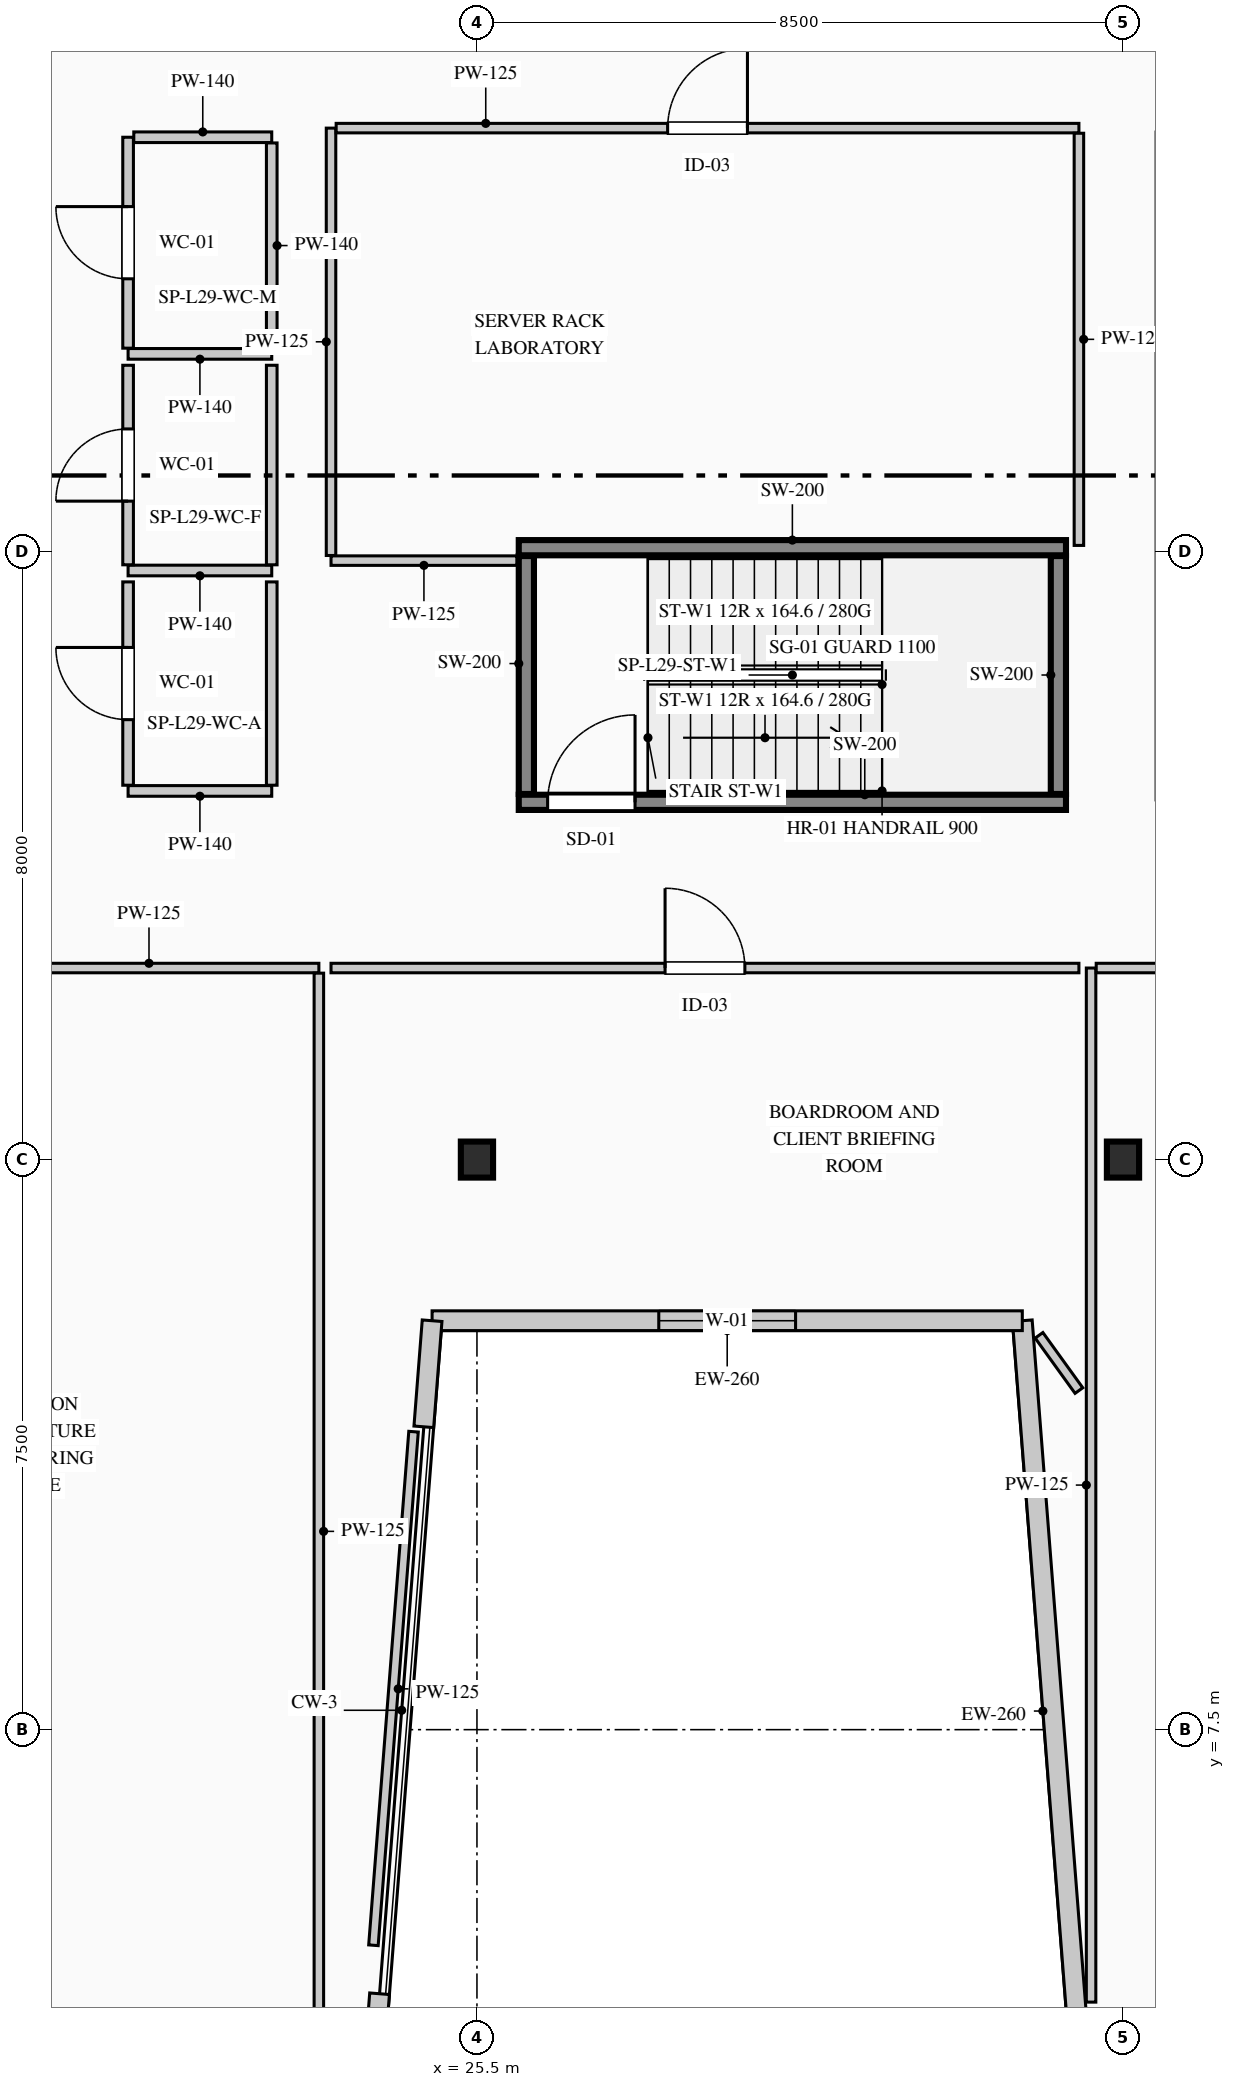
"""IFC4 building model, lengths in metres.
Left out: names, types, materials, properties, quantities, classifications, styles, units other than length and angle.
Written with IfcOpenShell. Run it as: python <this file> out.ifc"""

import sys

from ifc_helpers import new_model, si_unit, direction, frame, frame_2d, origin, origin_2d, place, context, subcontext, project, spatial, rectangle, i_section, extrude, element, fill, save


model = new_model("IFC4")
c1 = context("Model", 3, precision=1e-05, world=origin(), true_north=direction((0.0, 1.0)))
c2 = subcontext(c1, "Body", "Model", "MODEL_VIEW")
j1 = project(units=[si_unit("LENGTHUNIT", "METRE"), si_unit("PLANEANGLEUNIT", "RADIAN")], contexts=[c1])
p1 = place(None, origin())
s1 = spatial("IfcSite", under=j1, at=p1, CompositionType="ELEMENT")
p2 = place(p1, origin())
s2 = spatial("IfcBuilding", under=s1, at=p2, CompositionType="ELEMENT")
p3 = place(p2, frame((0.0, 0.0, 127.2)))
s3 = spatial("IfcBuildingStorey", under=s2, at=p3, CompositionType="ELEMENT", Elevation=127.2)
p4 = place(p3, frame((26.05, 19.7, 0.0), z_axis=(0.0, 0.0, 1.0), x_axis=(1.0, 0.0, 0.0)))
e1 = element("IfcWall", 1, at=p4, inside=s3, PredefinedType="SHEAR", context=c2, shape_type="SweptSolid", body=[
    extrude(rectangle(XDim=7.2, YDim=0.2, at=frame_2d((3.6, 0.0))), origin(), (0.0, 0.0, 1.0), 3.95),
])
p5 = place(p4, frame((0.38, 0.0, 0.0)))
e2 = element("IfcOpeningElement", 2, at=p5, cuts=e1, PredefinedType="OPENING", context=c2, shape_type="SweptSolid", body=[
    extrude(rectangle(XDim=1.15, YDim=2.2, at=frame_2d((0.575, 1.1))), frame((0.0, 0.11, 0.0), z_axis=(0.0, -1.0, 0.0), x_axis=(1.0, 0.0, 0.0)), (0.0, 0.0, 1.0), 0.22),
])
p6 = place(p3, frame((26.05, 23.05, 0.0), z_axis=(0.0, 0.0, 1.0), x_axis=(1.0, 0.0, 0.0)))
e3 = element("IfcWall", 3, at=p6, inside=s3, PredefinedType="SHEAR", context=c2, shape_type="SweptSolid", body=[
    extrude(rectangle(XDim=7.2, YDim=0.2, at=frame_2d((3.6, 0.0))), origin(), (0.0, 0.0, 1.0), 3.95),
])
for number, where, z_axis, x_axis in (
    (4, (26.15, 19.81, 0.0), (0.0, 0.0, 1.0), (0.0, 1.0, 0.0)),
    (5, (33.15, 19.81, 0.0), (0.0, 0.0, 1.0), (0.0, 1.0, 0.0)),
):
    element("IfcWall", number, at=place(p3, frame(where, z_axis=z_axis, x_axis=x_axis)), inside=s3, PredefinedType="SHEAR", context=c2, shape_type="SweptSolid", body=[
        extrude(rectangle(XDim=3.13, YDim=0.2, at=frame_2d((1.565, 0.0))), origin(), (0.0, 0.0, 1.0), 3.95),
    ])
for number, where, z_axis, x_axis in (
    (6, (25.5, 15.0, 0.0), (0.0, 0.0, 1.0), (1.0, 0.0, 0.0)),
    (7, (34.0, 15.0, 0.0), (0.0, 0.0, 1.0), (1.0, 0.0, 0.0)),
):
    element("IfcColumn", number, at=place(p3, frame(where, z_axis=z_axis, x_axis=x_axis)), inside=s3, PredefinedType="COLUMN", context=c2, shape_type="SweptSolid", body=[
        extrude(i_section(OverallWidth=0.424, OverallDepth=0.474, WebThickness=0.048, FlangeThickness=0.077, FilletRadius=0.015, at=origin_2d()), origin(), (0.0, 0.0, 1.0), 3.95),
    ])
p7 = place(p3, frame((33.475, 2.63, 0.0), z_axis=(0.0, 0.0, 1.0), x_axis=(-0.077793257511, 0.996969512616, 0.0)))
e8 = element("IfcWall", 8, at=p7, inside=s3, PredefinedType="STANDARD", context=c2, shape_type="SweptSolid", body=[
    extrude(rectangle(XDim=10.281, YDim=0.26, at=frame_2d((5.141, 0.0))), origin(), (0.0, 0.0, 1.0), 3.69),
])
p8 = place(p3, frame((32.675, 12.88, 0.0), z_axis=(0.0, 0.0, 1.0), x_axis=(-1.0, 0.0, 0.0)))
e9 = element("IfcWall", 9, at=p8, inside=s3, PredefinedType="STANDARD", context=c2, shape_type="SweptSolid", body=[
    extrude(rectangle(XDim=7.765, YDim=0.26, at=frame_2d((3.883, 0.0))), origin(), (0.0, 0.0, 1.0), 3.69),
])
p9 = place(p8, frame((2.983, 0.0, 0.9)))
e10 = element("IfcOpeningElement", 10, at=p9, cuts=e9, PredefinedType="OPENING", context=c2, shape_type="SweptSolid", body=[
    extrude(rectangle(XDim=1.8, YDim=2.1, at=frame_2d((0.9, 1.05))), frame((0.0, 0.14, 0.0), z_axis=(0.0, -1.0, 0.0), x_axis=(1.0, 0.0, 0.0)), (0.0, 0.0, 1.0), 0.28),
])
for number, where, z_axis, x_axis in (
    (11, (24.91, 12.88, 0.0), (0.0, 0.0, 1.0), (-0.078, -0.997, 0.0)),
    (12, (24.219, 4.026, 0.0), (0.0, 0.0, 1.0), (-0.078, -0.997, 0.0)),
):
    element("IfcWall", number, at=place(p3, frame(where, z_axis=z_axis, x_axis=x_axis)), inside=s3, PredefinedType="STANDARD", context=c2, shape_type="SweptSolid", body=[
        extrude(rectangle(XDim=1.4, YDim=0.26, at=frame_2d((0.7, 0.0))), origin(), (0.0, 0.0, 1.0), 3.69),
    ])
p10 = place(p3, frame((22.8, 25.6, 0.0), z_axis=(0.0, 0.0, 1.0), x_axis=(-1.0, 0.0, 0.0)))
e13 = element("IfcWall", 13, at=p10, inside=s3, PredefinedType="PARTITIONING", context=c2, shape_type="SweptSolid", body=[
    extrude(rectangle(XDim=1.89, YDim=0.14, at=frame_2d((0.945, 0.0))), origin(), (0.0, 0.0, 1.0), 3.69),
])
p11 = place(p3, frame((20.91, 25.675, 0.0), z_axis=(0.0, 0.0, 1.0), x_axis=(0.0, 1.0, 0.0)))
e14 = element("IfcWall", 14, at=p11, inside=s3, PredefinedType="PARTITIONING", context=c2, shape_type="SweptSolid", body=[
    extrude(rectangle(XDim=2.775, YDim=0.14, at=frame_2d((1.387, 0.0))), origin(), (0.0, 0.0, 1.0), 3.69),
])
p12 = place(p11, frame((0.913, 0.0, 0.0)))
e15 = element("IfcOpeningElement", 15, at=p12, cuts=e14, PredefinedType="OPENING", context=c2, shape_type="SweptSolid", body=[
    extrude(rectangle(XDim=0.95, YDim=2.15, at=frame_2d((0.475, 1.075))), frame((0.0, 0.08, 0.0), z_axis=(0.0, -1.0, 0.0), x_axis=(1.0, 0.0, 0.0)), (0.0, 0.0, 1.0), 0.16),
])
p13 = place(p3, frame((20.985, 28.45, 0.0), z_axis=(0.0, 0.0, 1.0), x_axis=(1.0, 0.0, 0.0)))
e16 = element("IfcWall", 16, at=p13, inside=s3, PredefinedType="PARTITIONING", context=c2, shape_type="SweptSolid", body=[
    extrude(rectangle(XDim=1.815, YDim=0.14, at=frame_2d((0.907, 0.0))), origin(), (0.0, 0.0, 1.0), 3.69),
])
p14 = place(p3, frame((22.8, 28.375, 0.0), z_axis=(0.0, 0.0, 1.0), x_axis=(0.0, -1.0, 0.0)))
e17 = element("IfcWall", 17, at=p14, inside=s3, PredefinedType="PARTITIONING", context=c2, shape_type="SweptSolid", body=[
    extrude(rectangle(XDim=2.7, YDim=0.14, at=frame_2d((1.35, 0.0))), origin(), (0.0, 0.0, 1.0), 3.375),
])
p15 = place(p3, frame((22.8, 22.75, 0.0), z_axis=(0.0, 0.0, 1.0), x_axis=(-1.0, 0.0, 0.0)))
e18 = element("IfcWall", 18, at=p15, inside=s3, PredefinedType="PARTITIONING", context=c2, shape_type="SweptSolid", body=[
    extrude(rectangle(XDim=1.89, YDim=0.14, at=frame_2d((0.945, 0.0))), origin(), (0.0, 0.0, 1.0), 3.69),
])
p16 = place(p3, frame((20.91, 22.825, 0.0), z_axis=(0.0, 0.0, 1.0), x_axis=(0.0, 1.0, 0.0)))
e19 = element("IfcWall", 19, at=p16, inside=s3, PredefinedType="PARTITIONING", context=c2, shape_type="SweptSolid", body=[
    extrude(rectangle(XDim=2.625, YDim=0.14, at=frame_2d((1.312, 0.0))), origin(), (0.0, 0.0, 1.0), 3.69),
])
p17 = place(p16, frame((0.837, 0.0, 0.0)))
e20 = element("IfcOpeningElement", 20, at=p17, cuts=e19, PredefinedType="OPENING", context=c2, shape_type="SweptSolid", body=[
    extrude(rectangle(XDim=0.95, YDim=2.15, at=frame_2d((0.475, 1.075))), frame((0.0, 0.08, 0.0), z_axis=(0.0, -1.0, 0.0), x_axis=(1.0, 0.0, 0.0)), (0.0, 0.0, 1.0), 0.16),
])
p18 = place(p3, frame((22.8, 25.45, 0.0), z_axis=(0.0, 0.0, 1.0), x_axis=(0.0, -1.0, 0.0)))
e21 = element("IfcWall", 21, at=p18, inside=s3, PredefinedType="PARTITIONING", context=c2, shape_type="SweptSolid", body=[
    extrude(rectangle(XDim=2.625, YDim=0.14, at=frame_2d((1.312, 0.0))), origin(), (0.0, 0.0, 1.0), 3.375),
])
p19 = place(p3, frame((22.8, 19.85, 0.0), z_axis=(0.0, 0.0, 1.0), x_axis=(-1.0, 0.0, 0.0)))
e22 = element("IfcWall", 22, at=p19, inside=s3, PredefinedType="PARTITIONING", context=c2, shape_type="SweptSolid", body=[
    extrude(rectangle(XDim=1.89, YDim=0.14, at=frame_2d((0.945, 0.0))), origin(), (0.0, 0.0, 1.0), 3.69),
])
p20 = place(p3, frame((20.91, 19.925, 0.0), z_axis=(0.0, 0.0, 1.0), x_axis=(0.0, 1.0, 0.0)))
e23 = element("IfcWall", 23, at=p20, inside=s3, PredefinedType="PARTITIONING", context=c2, shape_type="SweptSolid", body=[
    extrude(rectangle(XDim=2.675, YDim=0.14, at=frame_2d((1.337, 0.0))), origin(), (0.0, 0.0, 1.0), 3.69),
])
p21 = place(p20, frame((0.863, 0.0, 0.0)))
e24 = element("IfcOpeningElement", 24, at=p21, cuts=e23, PredefinedType="OPENING", context=c2, shape_type="SweptSolid", body=[
    extrude(rectangle(XDim=0.95, YDim=2.15, at=frame_2d((0.475, 1.075))), frame((0.0, 0.08, 0.0), z_axis=(0.0, -1.0, 0.0), x_axis=(1.0, 0.0, 0.0)), (0.0, 0.0, 1.0), 0.16),
])
p22 = place(p3, frame((22.8, 22.6, 0.0), z_axis=(0.0, 0.0, 1.0), x_axis=(0.0, -1.0, 0.0)))
e25 = element("IfcWall", 25, at=p22, inside=s3, PredefinedType="PARTITIONING", context=c2, shape_type="SweptSolid", body=[
    extrude(rectangle(XDim=2.675, YDim=0.14, at=frame_2d((1.337, 0.0))), origin(), (0.0, 0.0, 1.0), 3.375),
])
p23 = place(p3, frame((12.58, 17.52, 0.0), z_axis=(0.0, 0.0, 1.0), x_axis=(1.0, 0.0, 0.0)))
e26 = element("IfcWall", 26, at=p23, inside=s3, PredefinedType="PARTITIONING", context=c2, shape_type="SweptSolid", body=[
    extrude(rectangle(XDim=10.84, YDim=0.125, at=frame_2d((5.42, 0.0))), origin(), (0.0, 0.0, 1.0), 3.69),
])
p24 = place(p23, frame((4.895, 0.0, 0.0)))
e27 = element("IfcOpeningElement", 27, at=p24, cuts=e26, PredefinedType="OPENING", context=c2, shape_type="SweptSolid", body=[
    extrude(rectangle(XDim=1.05, YDim=2.15, at=frame_2d((0.525, 1.075))), frame((0.0, 0.073, 0.0), z_axis=(0.0, -1.0, 0.0), x_axis=(1.0, 0.0, 0.0)), (0.0, 0.0, 1.0), 0.145),
])
p25 = place(p3, frame((23.42, 17.452, 0.0), z_axis=(0.0, 0.0, 1.0), x_axis=(0.0, -1.0, 0.0)))
e28 = element("IfcWall", 28, at=p25, inside=s3, PredefinedType="PARTITIONING", context=c2, shape_type="SweptSolid", body=[
    extrude(rectangle(XDim=14.688, YDim=0.125, at=frame_2d((7.344, 0.0))), origin(), (0.0, 0.0, 1.0), 3.69),
])
p26 = place(p3, frame((33.58, 3.915, 0.0), z_axis=(0.0, 0.0, 1.0), x_axis=(0.0, 1.0, 0.0)))
e29 = element("IfcWall", 29, at=p26, inside=s3, PredefinedType="PARTITIONING", context=c2, shape_type="SweptSolid", body=[
    extrude(rectangle(XDim=13.605, YDim=0.125, at=frame_2d((6.802, 0.0))), origin(), (0.0, 0.0, 1.0), 3.69),
])
p27 = place(p3, frame((33.647, 17.52, 0.0), z_axis=(0.0, 0.0, 1.0), x_axis=(1.0, 0.0, 0.0)))
e30 = element("IfcWall", 30, at=p27, inside=s3, PredefinedType="PARTITIONING", context=c2, shape_type="SweptSolid", body=[
    extrude(rectangle(XDim=8.772, YDim=0.125, at=frame_2d((4.386, 0.0))), origin(), (0.0, 0.0, 1.0), 3.375),
])
p28 = place(p27, frame((3.861, 0.0, 0.0)))
e31 = element("IfcOpeningElement", 31, at=p28, cuts=e30, PredefinedType="OPENING", context=c2, shape_type="SweptSolid", body=[
    extrude(rectangle(XDim=1.05, YDim=2.15, at=frame_2d((0.525, 1.075))), frame((0.0, 0.073, 0.0), z_axis=(0.0, -1.0, 0.0), x_axis=(1.0, 0.0, 0.0)), (0.0, 0.0, 1.0), 0.145),
])
p29 = place(p3, frame((33.42, 11.961, 0.0), z_axis=(0.0, 0.0, 1.0), x_axis=(-0.58517236533, 0.810908936228, 0.0)))
e32 = element("IfcWall", 32, at=p29, inside=s3, PredefinedType="PARTITIONING", context=c2, shape_type="SweptSolid", body=[
    extrude(rectangle(XDim=0.896, YDim=0.125, at=frame_2d((0.448, 0.0))), origin(), (0.0, 0.0, 1.0), 3.69),
])
p30 = place(p3, frame((24.666, 11.42, 0.0), z_axis=(0.0, 0.0, 1.0), x_axis=(-0.077847945506, -0.996965243818, 0.0)))
e33 = element("IfcWall", 33, at=p30, inside=s3, PredefinedType="PARTITIONING", context=c2, shape_type="SweptSolid", body=[
    extrude(rectangle(XDim=6.777, YDim=0.125, at=frame_2d((3.389, 0.0))), origin(), (0.0, 0.0, 1.0), 3.69),
])
p31 = place(p3, frame((23.58, 17.52, 0.0), z_axis=(0.0, 0.0, 1.0), x_axis=(1.0, 0.0, 0.0)))
e34 = element("IfcWall", 34, at=p31, inside=s3, PredefinedType="PARTITIONING", context=c2, shape_type="SweptSolid", body=[
    extrude(rectangle(XDim=9.84, YDim=0.125, at=frame_2d((4.92, 0.0))), origin(), (0.0, 0.0, 1.0), 3.375),
])
p32 = place(p31, frame((4.395, 0.0, 0.0)))
e35 = element("IfcOpeningElement", 35, at=p32, cuts=e34, PredefinedType="OPENING", context=c2, shape_type="SweptSolid", body=[
    extrude(rectangle(XDim=1.05, YDim=2.15, at=frame_2d((0.525, 1.075))), frame((0.0, 0.073, 0.0), z_axis=(0.0, -1.0, 0.0), x_axis=(1.0, 0.0, 0.0)), (0.0, 0.0, 1.0), 0.145),
])
p33 = place(p3, frame((26.025, 22.88, 0.0), z_axis=(0.0, 0.0, 1.0), x_axis=(-1.0, 0.0, 0.0)))
e36 = element("IfcWall", 36, at=p33, inside=s3, PredefinedType="PARTITIONING", context=c2, shape_type="SweptSolid", body=[
    extrude(rectangle(XDim=2.445, YDim=0.125, at=frame_2d((1.222, 0.0))), origin(), (0.0, 0.0, 1.0), 3.69),
])
p34 = place(p3, frame((23.58, 22.948, 0.0), z_axis=(0.0, 0.0, 1.0), x_axis=(0.0, 1.0, 0.0)))
e37 = element("IfcWall", 37, at=p34, inside=s3, PredefinedType="PARTITIONING", context=c2, shape_type="SweptSolid", body=[
    extrude(rectangle(XDim=5.623, YDim=0.125, at=frame_2d((2.811, 0.0))), origin(), (0.0, 0.0, 1.0), 3.69),
])
p35 = place(p3, frame((23.647, 28.57, 0.0), z_axis=(0.0, 0.0, 1.0), x_axis=(1.0, 0.0, 0.0)))
e38 = element("IfcWall", 38, at=p35, inside=s3, PredefinedType="PARTITIONING", context=c2, shape_type="SweptSolid", body=[
    extrude(rectangle(XDim=9.772, YDim=0.125, at=frame_2d((4.886, 0.0))), origin(), (0.0, 0.0, 1.0), 3.375),
])
p36 = place(p35, frame((4.361, 0.0, 0.0)))
e39 = element("IfcOpeningElement", 39, at=p36, cuts=e38, PredefinedType="OPENING", context=c2, shape_type="SweptSolid", body=[
    extrude(rectangle(XDim=1.05, YDim=2.15, at=frame_2d((0.525, 1.075))), frame((0.0, 0.073, 0.0), z_axis=(0.0, -1.0, 0.0), x_axis=(1.0, 0.0, 0.0)), (0.0, 0.0, 1.0), 0.145),
])
p37 = place(p3, frame((33.42, 28.502, 0.0), z_axis=(0.0, 0.0, 1.0), x_axis=(0.0, -1.0, 0.0)))
e40 = element("IfcWall", 40, at=p37, inside=s3, PredefinedType="PARTITIONING", context=c2, shape_type="SweptSolid", body=[
    extrude(rectangle(XDim=5.422, YDim=0.125, at=frame_2d((2.711, 0.0))), origin(), (0.0, 0.0, 1.0), 3.69),
])
p38 = place(p9, origin())
e41 = element("IfcWindow", 41, at=p38, inside=s3, PartitioningType="SINGLE_PANEL", PredefinedType="WINDOW", context=c2, shape_type="SweptSolid", body=[
    extrude(rectangle(XDim=1.8, YDim=2.1, at=frame_2d((0.9, 1.05))), frame((0.0, 0.03, 0.0), z_axis=(0.0, -1.0, 0.0), x_axis=(1.0, 0.0, 0.0)), (0.0, 0.0, 1.0), 0.06),
])
fill(e10, e41)
p39 = place(p5, origin())
e42 = element("IfcDoor", 42, at=p39, inside=s3, OperationType="SINGLE_SWING_RIGHT", PredefinedType="DOOR", context=c2, shape_type="SweptSolid", body=[
    extrude(rectangle(XDim=1.15, YDim=2.2, at=frame_2d((0.575, 1.1))), frame((0.0, 0.025, 0.0), z_axis=(0.0, -1.0, 0.0), x_axis=(1.0, 0.0, 0.0)), (0.0, 0.0, 1.0), 0.05),
])
fill(e2, e42)
p40 = place(p12, origin())
e43 = element("IfcDoor", 43, at=p40, inside=s3, OperationType="SINGLE_SWING_RIGHT", PredefinedType="DOOR", context=c2, shape_type="SweptSolid", body=[
    extrude(rectangle(XDim=0.95, YDim=2.15, at=frame_2d((0.475, 1.075))), frame((0.0, 0.025, 0.0), z_axis=(0.0, -1.0, 0.0), x_axis=(1.0, 0.0, 0.0)), (0.0, 0.0, 1.0), 0.05),
])
fill(e15, e43)
p41 = place(p17, origin())
e44 = element("IfcDoor", 44, at=p41, inside=s3, OperationType="SINGLE_SWING_LEFT", PredefinedType="DOOR", context=c2, shape_type="SweptSolid", body=[
    extrude(rectangle(XDim=0.95, YDim=2.15, at=frame_2d((0.475, 1.075))), frame((0.0, 0.025, 0.0), z_axis=(0.0, -1.0, 0.0), x_axis=(1.0, 0.0, 0.0)), (0.0, 0.0, 1.0), 0.05),
])
fill(e20, e44)
p42 = place(p21, origin())
e45 = element("IfcDoor", 45, at=p42, inside=s3, OperationType="SINGLE_SWING_RIGHT", PredefinedType="DOOR", context=c2, shape_type="SweptSolid", body=[
    extrude(rectangle(XDim=0.95, YDim=2.15, at=frame_2d((0.475, 1.075))), frame((0.0, 0.025, 0.0), z_axis=(0.0, -1.0, 0.0), x_axis=(1.0, 0.0, 0.0)), (0.0, 0.0, 1.0), 0.05),
])
fill(e24, e45)
p43 = place(p32, origin())
e46 = element("IfcDoor", 46, at=p43, inside=s3, OperationType="SINGLE_SWING_LEFT", PredefinedType="DOOR", context=c2, shape_type="SweptSolid", body=[
    extrude(rectangle(XDim=1.05, YDim=2.15, at=frame_2d((0.525, 1.075))), frame((0.0, 0.025, 0.0), z_axis=(0.0, -1.0, 0.0), x_axis=(1.0, 0.0, 0.0)), (0.0, 0.0, 1.0), 0.05),
])
fill(e35, e46)
p44 = place(p36, origin())
e47 = element("IfcDoor", 47, at=p44, inside=s3, OperationType="SINGLE_SWING_RIGHT", PredefinedType="DOOR", context=c2, shape_type="SweptSolid", body=[
    extrude(rectangle(XDim=1.05, YDim=2.15, at=frame_2d((0.525, 1.075))), frame((0.0, 0.025, 0.0), z_axis=(0.0, -1.0, 0.0), x_axis=(1.0, 0.0, 0.0)), (0.0, 0.0, 1.0), 0.05),
])
fill(e39, e47)
save(model, sys.argv[1])
